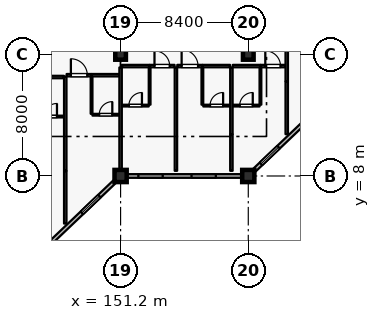
"""IFC4 building model, lengths in metres.
Left out: names, types, materials, properties, quantities, classifications, styles, units other than length and angle.
Written with IfcOpenShell. Run it as: python <this file> out.ifc"""

import sys

from ifc_helpers import new_model, si_unit, direction, frame, frame_2d, origin, origin_2d, place, context, subcontext, project, spatial, rectangle, extrude, element, fill, save


model = new_model("IFC4")
c1 = context("Model", 3, precision=1e-05, world=origin(), true_north=direction((0.0, 1.0)))
c2 = subcontext(c1, "Body", "Model", "MODEL_VIEW")
j1 = project(units=[si_unit("LENGTHUNIT", "METRE"), si_unit("PLANEANGLEUNIT", "RADIAN")], contexts=[c1])
p1 = place(None, origin())
s1 = spatial("IfcSite", under=j1, at=p1, CompositionType="ELEMENT")
p2 = place(p1, origin())
s2 = spatial("IfcBuilding", under=s1, at=p2, CompositionType="ELEMENT")
p3 = place(p2, frame((0.0, 0.0, 11.4)))
s3 = spatial("IfcBuildingStorey", under=s2, at=p3, CompositionType="ELEMENT", Elevation=11.4)
for number, where, z_axis, x_axis in (
    (1, (151.2, 8.0, 0.0), (0.0, 0.0, 1.0), (1.0, 0.0, 0.0)),
    (2, (159.6, 8.0, 0.0), (0.0, 0.0, 1.0), (1.0, 0.0, 0.0)),
):
    element("IfcColumn", number, at=place(p3, frame(where, z_axis=z_axis, x_axis=x_axis)), inside=s3, PredefinedType="COLUMN", context=c2, shape_type="SweptSolid", body=[
        extrude(rectangle(XDim=0.8, YDim=0.8, at=origin_2d()), origin(), (0.0, 0.0, 1.0), 4.8),
    ])
for number, where, z_axis, x_axis in (
    (3, (151.2, 16.0, 0.0), (0.0, 0.0, 1.0), (1.0, 0.0, 0.0)),
    (4, (159.6, 16.0, 0.0), (0.0, 0.0, 1.0), (1.0, 0.0, 0.0)),
):
    element("IfcColumn", number, at=place(p3, frame(where, z_axis=z_axis, x_axis=x_axis)), inside=s3, PredefinedType="COLUMN", context=c2, shape_type="SweptSolid", body=[
        extrude(rectangle(XDim=0.7, YDim=0.7, at=origin_2d()), origin(), (0.0, 0.0, 1.0), 4.8),
    ])
p4 = place(p3, frame((150.8, 7.619, 0.0), z_axis=(0.0, 0.0, 1.0), x_axis=(-0.724156739794, -0.689635422677, 0.0)))
e5 = element("IfcWall", 5, at=p4, inside=s3, PredefinedType="SOLIDWALL", context=c2, shape_type="SweptSolid", body=[
    extrude(rectangle(XDim=10.495, YDim=0.24, at=frame_2d((5.248, 0.0))), origin(), (0.0, 0.0, 1.0), 4.13),
])
p5 = place(p4, frame((1.368, 0.0, 0.8)))
e6 = element("IfcOpeningElement", 6, at=p5, cuts=e5, PredefinedType="OPENING", context=c2, shape_type="SweptSolid", body=[
    extrude(rectangle(XDim=1.6, YDim=1.6, at=frame_2d((0.8, 0.8))), frame((0.0, 0.13, 0.0), z_axis=(0.0, -1.0, 0.0), x_axis=(1.0, 0.0, 0.0)), (0.0, 0.0, 1.0), 0.26),
])
p6 = place(p4, frame((6.194, 0.0, 0.8)))
e7 = element("IfcOpeningElement", 7, at=p6, cuts=e5, PredefinedType="OPENING", context=c2, shape_type="SweptSolid", body=[
    extrude(rectangle(XDim=1.6, YDim=1.6, at=frame_2d((0.8, 0.8))), frame((0.0, 0.13, 0.0), z_axis=(0.0, -1.0, 0.0), x_axis=(1.0, 0.0, 0.0)), (0.0, 0.0, 1.0), 0.26),
])
p7 = place(p3, frame((159.2, 8.0, 0.0), z_axis=(0.0, 0.0, 1.0), x_axis=(-1.0, 0.0, 0.0)))
e8 = element("IfcWall", 8, at=p7, inside=s3, PredefinedType="SOLIDWALL", context=c2, shape_type="SweptSolid", body=[
    extrude(rectangle(XDim=7.6, YDim=0.24, at=frame_2d((3.8, 0.0))), origin(), (0.0, 0.0, 1.0), 4.13),
])
p8 = place(p7, frame((1.735, 0.0, 0.8)))
e9 = element("IfcOpeningElement", 9, at=p8, cuts=e8, PredefinedType="OPENING", context=c2, shape_type="SweptSolid", body=[
    extrude(rectangle(XDim=1.6, YDim=1.6, at=frame_2d((0.8, 0.8))), frame((0.0, 0.13, 0.0), z_axis=(0.0, -1.0, 0.0), x_axis=(1.0, 0.0, 0.0)), (0.0, 0.0, 1.0), 0.26),
])
p9 = place(p7, frame((5.23, 0.0, 0.8)))
e10 = element("IfcOpeningElement", 10, at=p9, cuts=e8, PredefinedType="OPENING", context=c2, shape_type="SweptSolid", body=[
    extrude(rectangle(XDim=1.6, YDim=1.6, at=frame_2d((0.8, 0.8))), frame((0.0, 0.13, 0.0), z_axis=(0.0, -1.0, 0.0), x_axis=(1.0, 0.0, 0.0)), (0.0, 0.0, 1.0), 0.26),
])
p10 = place(p3, frame((167.6, 15.619, 0.0), z_axis=(0.0, 0.0, 1.0), x_axis=(-0.724156739794, -0.689635422677, 0.0)))
e11 = element("IfcWall", 11, at=p10, inside=s3, PredefinedType="SOLIDWALL", context=c2, shape_type="SweptSolid", body=[
    extrude(rectangle(XDim=10.495, YDim=0.24, at=frame_2d((5.248, 0.0))), origin(), (0.0, 0.0, 1.0), 4.13),
])
p11 = place(p10, frame((0.388, 0.0, 0.8)))
e12 = element("IfcOpeningElement", 12, at=p11, cuts=e11, PredefinedType="OPENING", context=c2, shape_type="SweptSolid", body=[
    extrude(rectangle(XDim=1.6, YDim=1.6, at=frame_2d((0.8, 0.8))), frame((0.0, 0.13, 0.0), z_axis=(0.0, -1.0, 0.0), x_axis=(1.0, 0.0, 0.0)), (0.0, 0.0, 1.0), 0.26),
])
p12 = place(p10, frame((4.234, 0.0, 0.8)))
e13 = element("IfcOpeningElement", 13, at=p12, cuts=e11, PredefinedType="OPENING", context=c2, shape_type="SweptSolid", body=[
    extrude(rectangle(XDim=1.6, YDim=1.6, at=frame_2d((0.8, 0.8))), frame((0.0, 0.13, 0.0), z_axis=(0.0, -1.0, 0.0), x_axis=(1.0, 0.0, 0.0)), (0.0, 0.0, 1.0), 0.26),
])
p13 = place(p10, frame((8.294, 0.0, 0.8)))
e14 = element("IfcOpeningElement", 14, at=p13, cuts=e11, PredefinedType="OPENING", context=c2, shape_type="SweptSolid", body=[
    extrude(rectangle(XDim=1.6, YDim=1.6, at=frame_2d((0.8, 0.8))), frame((0.0, 0.13, 0.0), z_axis=(0.0, -1.0, 0.0), x_axis=(1.0, 0.0, 0.0)), (0.0, 0.0, 1.0), 0.26),
])
p14 = place(p3, frame((145.66, 14.51, 0.0), z_axis=(0.0, 0.0, 1.0), x_axis=(1.0, 0.0, 0.0)))
e15 = element("IfcWall", 15, at=p14, inside=s3, PredefinedType="PARTITIONING", context=c2, shape_type="SweptSolid", body=[
    extrude(rectangle(XDim=1.81, YDim=0.16, at=frame_2d((0.905, 0.0))), origin(), (0.0, 0.0, 1.0), 4.535),
])
p15 = place(p3, frame((145.71, 11.91, 0.0), z_axis=(0.0, 0.0, 1.0), x_axis=(1.0, 0.0, 0.0)))
e16 = element("IfcWall", 16, at=p15, inside=s3, PredefinedType="PARTITIONING", context=c2, shape_type="SweptSolid", body=[
    extrude(rectangle(XDim=1.75, YDim=0.115, at=frame_2d((0.875, 0.0))), origin(), (0.0, 0.0, 1.0), 4.535),
])
p16 = place(p15, frame((0.445, 0.0, 0.0)))
e17 = element("IfcOpeningElement", 17, at=p16, cuts=e16, PredefinedType="OPENING", context=c2, shape_type="SweptSolid", body=[
    extrude(rectangle(XDim=0.86, YDim=2.12, at=frame_2d((0.43, 1.06))), frame((0.0, 0.067, 0.0), z_axis=(0.0, -1.0, 0.0), x_axis=(1.0, 0.0, 0.0)), (0.0, 0.0, 1.0), 0.135),
])
p17 = place(p3, frame((147.56, 4.87, 0.0), z_axis=(0.0, 0.0, 1.0), x_axis=(0.0, 1.0, 0.0)))
e18 = element("IfcWall", 18, at=p17, inside=s3, PredefinedType="PARTITIONING", context=c2, shape_type="SweptSolid", body=[
    extrude(rectangle(XDim=3.46, YDim=0.16, at=frame_2d((1.73, 0.0))), origin(), (0.0, 0.0, 1.0), 4.535),
])
p18 = place(p3, frame((147.65, 14.63, 0.0), z_axis=(0.0, 0.0, 1.0), x_axis=(1.0, 0.0, 0.0)))
e19 = element("IfcWall", 19, at=p18, inside=s3, PredefinedType="PARTITIONING", context=c2, shape_type="SweptSolid", body=[
    extrude(rectangle(XDim=1.64, YDim=0.16, at=frame_2d((0.82, 0.0))), origin(), (0.0, 0.0, 1.0), 4.535),
])
p19 = place(p18, frame((0.28, 0.0, 0.0)))
e20 = element("IfcOpeningElement", 20, at=p19, cuts=e19, PredefinedType="OPENING", context=c2, shape_type="SweptSolid", body=[
    extrude(rectangle(XDim=1.08, YDim=2.3, at=frame_2d((0.54, 1.15))), frame((0.0, 0.09, 0.0), z_axis=(0.0, -1.0, 0.0), x_axis=(1.0, 0.0, 0.0)), (0.0, 0.0, 1.0), 0.18),
])
p20 = place(p3, frame((149.3, 14.63, 0.0), z_axis=(0.0, 0.0, 1.0), x_axis=(1.0, 0.0, 0.0)))
e21 = element("IfcWall", 21, at=p20, inside=s3, PredefinedType="PARTITIONING", context=c2, shape_type="SweptSolid", body=[
    extrude(rectangle(XDim=1.81, YDim=0.16, at=frame_2d((0.905, 0.0))), origin(), (0.0, 0.0, 1.0), 4.535),
])
p21 = place(p3, frame((149.29, 12.09, 0.0), z_axis=(0.0, 0.0, 1.0), x_axis=(0.0, 1.0, 0.0)))
e22 = element("IfcWall", 22, at=p21, inside=s3, PredefinedType="PARTITIONING", context=c2, shape_type="SweptSolid", body=[
    extrude(rectangle(XDim=2.45, YDim=0.115, at=frame_2d((1.225, 0.0))), origin(), (0.0, 0.0, 1.0), 4.535),
])
p22 = place(p3, frame((149.35, 12.03, 0.0), z_axis=(0.0, 0.0, 1.0), x_axis=(1.0, 0.0, 0.0)))
e23 = element("IfcWall", 23, at=p22, inside=s3, PredefinedType="PARTITIONING", context=c2, shape_type="SweptSolid", body=[
    extrude(rectangle(XDim=1.75, YDim=0.115, at=frame_2d((0.875, 0.0))), origin(), (0.0, 0.0, 1.0), 4.535),
])
p23 = place(p22, frame((0.445, 0.0, 0.0)))
e24 = element("IfcOpeningElement", 24, at=p23, cuts=e23, PredefinedType="OPENING", context=c2, shape_type="SweptSolid", body=[
    extrude(rectangle(XDim=0.86, YDim=2.12, at=frame_2d((0.43, 1.06))), frame((0.0, 0.067, 0.0), z_axis=(0.0, -1.0, 0.0), x_axis=(1.0, 0.0, 0.0)), (0.0, 0.0, 1.0), 0.135),
])
p24 = place(p3, frame((147.56, 8.34, 0.0), z_axis=(0.0, 0.0, 1.0), x_axis=(0.0, 1.0, 0.0)))
e25 = element("IfcWall", 25, at=p24, inside=s3, PredefinedType="PARTITIONING", context=c2, shape_type="SweptSolid", body=[
    extrude(rectangle(XDim=6.2, YDim=0.16, at=frame_2d((3.1, 0.0))), origin(), (0.0, 0.0, 1.0), 4.535),
])
p25 = place(p3, frame((151.29, 15.23, 0.0), z_axis=(0.0, 0.0, 1.0), x_axis=(1.0, 0.0, 0.0)))
e26 = element("IfcWall", 26, at=p25, inside=s3, PredefinedType="PARTITIONING", context=c2, shape_type="SweptSolid", body=[
    extrude(rectangle(XDim=1.81, YDim=0.16, at=frame_2d((0.905, 0.0))), origin(), (0.0, 0.0, 1.0), 4.535),
])
p26 = place(p3, frame((153.11, 15.23, 0.0), z_axis=(0.0, 0.0, 1.0), x_axis=(1.0, 0.0, 0.0)))
e27 = element("IfcWall", 27, at=p26, inside=s3, PredefinedType="PARTITIONING", context=c2, shape_type="SweptSolid", body=[
    extrude(rectangle(XDim=1.64, YDim=0.16, at=frame_2d((0.82, 0.0))), origin(), (0.0, 0.0, 1.0), 4.535),
])
p27 = place(p26, frame((0.32, 0.0, 0.0)))
e28 = element("IfcOpeningElement", 28, at=p27, cuts=e27, PredefinedType="OPENING", context=c2, shape_type="SweptSolid", body=[
    extrude(rectangle(XDim=1.0, YDim=2.25, at=frame_2d((0.5, 1.125))), frame((0.0, 0.09, 0.0), z_axis=(0.0, -1.0, 0.0), x_axis=(1.0, 0.0, 0.0)), (0.0, 0.0, 1.0), 0.18),
])
p28 = place(p3, frame((153.11, 12.69, 0.0), z_axis=(0.0, 0.0, 1.0), x_axis=(0.0, 1.0, 0.0)))
e29 = element("IfcWall", 29, at=p28, inside=s3, PredefinedType="PARTITIONING", context=c2, shape_type="SweptSolid", body=[
    extrude(rectangle(XDim=2.45, YDim=0.115, at=frame_2d((1.225, 0.0))), origin(), (0.0, 0.0, 1.0), 4.535),
])
p29 = place(p3, frame((151.3, 12.63, 0.0), z_axis=(0.0, 0.0, 1.0), x_axis=(1.0, 0.0, 0.0)))
e30 = element("IfcWall", 30, at=p29, inside=s3, PredefinedType="PARTITIONING", context=c2, shape_type="SweptSolid", body=[
    extrude(rectangle(XDim=1.75, YDim=0.115, at=frame_2d((0.875, 0.0))), origin(), (0.0, 0.0, 1.0), 4.535),
])
p30 = place(p29, frame((0.445, 0.0, 0.0)))
e31 = element("IfcOpeningElement", 31, at=p30, cuts=e30, PredefinedType="OPENING", context=c2, shape_type="SweptSolid", body=[
    extrude(rectangle(XDim=0.86, YDim=2.12, at=frame_2d((0.43, 1.06))), frame((0.0, 0.067, 0.0), z_axis=(0.0, -1.0, 0.0), x_axis=(1.0, 0.0, 0.0)), (0.0, 0.0, 1.0), 0.135),
])
p31 = place(p3, frame((151.2, 8.34, 0.0), z_axis=(0.0, 0.0, 1.0), x_axis=(0.0, 1.0, 0.0)))
e32 = element("IfcWall", 32, at=p31, inside=s3, PredefinedType="PARTITIONING", context=c2, shape_type="SweptSolid", body=[
    extrude(rectangle(XDim=6.8, YDim=0.16, at=frame_2d((3.4, 0.0))), origin(), (0.0, 0.0, 1.0), 3.98),
])
p32 = place(p3, frame((154.93, 15.23, 0.0), z_axis=(0.0, 0.0, 1.0), x_axis=(1.0, 0.0, 0.0)))
e33 = element("IfcWall", 33, at=p32, inside=s3, PredefinedType="PARTITIONING", context=c2, shape_type="SweptSolid", body=[
    extrude(rectangle(XDim=1.65, YDim=0.16, at=frame_2d((0.825, 0.0))), origin(), (0.0, 0.0, 1.0), 4.535),
])
p33 = place(p32, frame((0.285, 0.0, 0.0)))
e34 = element("IfcOpeningElement", 34, at=p33, cuts=e33, PredefinedType="OPENING", context=c2, shape_type="SweptSolid", body=[
    extrude(rectangle(XDim=1.08, YDim=2.3, at=frame_2d((0.54, 1.15))), frame((0.0, 0.09, 0.0), z_axis=(0.0, -1.0, 0.0), x_axis=(1.0, 0.0, 0.0)), (0.0, 0.0, 1.0), 0.18),
])
p34 = place(p3, frame((156.59, 15.23, 0.0), z_axis=(0.0, 0.0, 1.0), x_axis=(1.0, 0.0, 0.0)))
e35 = element("IfcWall", 35, at=p34, inside=s3, PredefinedType="PARTITIONING", context=c2, shape_type="SweptSolid", body=[
    extrude(rectangle(XDim=1.81, YDim=0.16, at=frame_2d((0.905, 0.0))), origin(), (0.0, 0.0, 1.0), 4.535),
])
p35 = place(p3, frame((156.58, 12.69, 0.0), z_axis=(0.0, 0.0, 1.0), x_axis=(0.0, 1.0, 0.0)))
e36 = element("IfcWall", 36, at=p35, inside=s3, PredefinedType="PARTITIONING", context=c2, shape_type="SweptSolid", body=[
    extrude(rectangle(XDim=2.45, YDim=0.115, at=frame_2d((1.225, 0.0))), origin(), (0.0, 0.0, 1.0), 4.535),
])
p36 = place(p3, frame((156.64, 12.63, 0.0), z_axis=(0.0, 0.0, 1.0), x_axis=(1.0, 0.0, 0.0)))
e37 = element("IfcWall", 37, at=p36, inside=s3, PredefinedType="PARTITIONING", context=c2, shape_type="SweptSolid", body=[
    extrude(rectangle(XDim=1.75, YDim=0.115, at=frame_2d((0.875, 0.0))), origin(), (0.0, 0.0, 1.0), 4.535),
])
p37 = place(p36, frame((0.445, 0.0, 0.0)))
e38 = element("IfcOpeningElement", 38, at=p37, cuts=e37, PredefinedType="OPENING", context=c2, shape_type="SweptSolid", body=[
    extrude(rectangle(XDim=0.86, YDim=2.12, at=frame_2d((0.43, 1.06))), frame((0.0, 0.067, 0.0), z_axis=(0.0, -1.0, 0.0), x_axis=(1.0, 0.0, 0.0)), (0.0, 0.0, 1.0), 0.135),
])
p38 = place(p3, frame((154.84, 8.34, 0.0), z_axis=(0.0, 0.0, 1.0), x_axis=(0.0, 1.0, 0.0)))
e39 = element("IfcWall", 39, at=p38, inside=s3, PredefinedType="PARTITIONING", context=c2, shape_type="SweptSolid", body=[
    extrude(rectangle(XDim=6.8, YDim=0.16, at=frame_2d((3.4, 0.0))), origin(), (0.0, 0.0, 1.0), 4.535),
])
p39 = place(p3, frame((158.49, 8.34, 0.0), z_axis=(0.0, 0.0, 1.0), x_axis=(0.0, 1.0, 0.0)))
e40 = element("IfcWall", 40, at=p39, inside=s3, PredefinedType="PARTITIONING", context=c2, shape_type="SweptSolid", body=[
    extrude(rectangle(XDim=2.4, YDim=0.16, at=frame_2d((1.2, 0.0))), origin(), (0.0, 0.0, 1.0), 4.535),
])
p40 = place(p3, frame((158.58, 15.23, 0.0), z_axis=(0.0, 0.0, 1.0), x_axis=(1.0, 0.0, 0.0)))
e41 = element("IfcWall", 41, at=p40, inside=s3, PredefinedType="PARTITIONING", context=c2, shape_type="SweptSolid", body=[
    extrude(rectangle(XDim=1.81, YDim=0.16, at=frame_2d((0.905, 0.0))), origin(), (0.0, 0.0, 1.0), 4.535),
])
p41 = place(p3, frame((160.4, 15.23, 0.0), z_axis=(0.0, 0.0, 1.0), x_axis=(1.0, 0.0, 0.0)))
e42 = element("IfcWall", 42, at=p41, inside=s3, PredefinedType="PARTITIONING", context=c2, shape_type="SweptSolid", body=[
    extrude(rectangle(XDim=1.64, YDim=0.16, at=frame_2d((0.82, 0.0))), origin(), (0.0, 0.0, 1.0), 4.535),
])
p42 = place(p41, frame((0.32, 0.0, 0.0)))
e43 = element("IfcOpeningElement", 43, at=p42, cuts=e42, PredefinedType="OPENING", context=c2, shape_type="SweptSolid", body=[
    extrude(rectangle(XDim=1.0, YDim=2.25, at=frame_2d((0.5, 1.125))), frame((0.0, 0.09, 0.0), z_axis=(0.0, -1.0, 0.0), x_axis=(1.0, 0.0, 0.0)), (0.0, 0.0, 1.0), 0.18),
])
p43 = place(p3, frame((160.4, 12.69, 0.0), z_axis=(0.0, 0.0, 1.0), x_axis=(0.0, 1.0, 0.0)))
e44 = element("IfcWall", 44, at=p43, inside=s3, PredefinedType="PARTITIONING", context=c2, shape_type="SweptSolid", body=[
    extrude(rectangle(XDim=2.45, YDim=0.115, at=frame_2d((1.225, 0.0))), origin(), (0.0, 0.0, 1.0), 4.535),
])
p44 = place(p3, frame((158.59, 12.63, 0.0), z_axis=(0.0, 0.0, 1.0), x_axis=(1.0, 0.0, 0.0)))
e45 = element("IfcWall", 45, at=p44, inside=s3, PredefinedType="PARTITIONING", context=c2, shape_type="SweptSolid", body=[
    extrude(rectangle(XDim=1.75, YDim=0.115, at=frame_2d((0.875, 0.0))), origin(), (0.0, 0.0, 1.0), 4.535),
])
p45 = place(p44, frame((0.445, 0.0, 0.0)))
e46 = element("IfcOpeningElement", 46, at=p45, cuts=e45, PredefinedType="OPENING", context=c2, shape_type="SweptSolid", body=[
    extrude(rectangle(XDim=0.86, YDim=2.12, at=frame_2d((0.43, 1.06))), frame((0.0, 0.067, 0.0), z_axis=(0.0, -1.0, 0.0), x_axis=(1.0, 0.0, 0.0)), (0.0, 0.0, 1.0), 0.135),
])
p46 = place(p3, frame((158.49, 10.75, 0.0), z_axis=(0.0, 0.0, 1.0), x_axis=(0.0, 1.0, 0.0)))
e47 = element("IfcWall", 47, at=p46, inside=s3, PredefinedType="PARTITIONING", context=c2, shape_type="SweptSolid", body=[
    extrude(rectangle(XDim=4.39, YDim=0.16, at=frame_2d((2.195, 0.0))), origin(), (0.0, 0.0, 1.0), 4.535),
])
p47 = place(p3, frame((162.13, 10.75, 0.0), z_axis=(0.0, 0.0, 1.0), x_axis=(0.0, 1.0, 0.0)))
e48 = element("IfcWall", 48, at=p47, inside=s3, PredefinedType="PARTITIONING", context=c2, shape_type="SweptSolid", body=[
    extrude(rectangle(XDim=3.47, YDim=0.16, at=frame_2d((1.735, 0.0))), origin(), (0.0, 0.0, 1.0), 4.535),
])
p48 = place(p3, frame((162.13, 14.23, 0.0), z_axis=(0.0, 0.0, 1.0), x_axis=(0.0, 1.0, 0.0)))
e49 = element("IfcWall", 49, at=p48, inside=s3, PredefinedType="PARTITIONING", context=c2, shape_type="SweptSolid", body=[
    extrude(rectangle(XDim=8.91, YDim=0.16, at=frame_2d((4.455, 0.0))), origin(), (0.0, 0.0, 1.0), 4.535),
])
p49 = place(p5, origin())
e50 = element("IfcWindow", 50, at=p49, inside=s3, PartitioningType="SINGLE_PANEL", PredefinedType="WINDOW", context=c2, shape_type="SweptSolid", body=[
    extrude(rectangle(XDim=1.6, YDim=1.6, at=frame_2d((0.8, 0.8))), frame((0.0, 0.03, 0.0), z_axis=(0.0, -1.0, 0.0), x_axis=(1.0, 0.0, 0.0)), (0.0, 0.0, 1.0), 0.06),
])
fill(e6, e50)
p50 = place(p8, origin())
e51 = element("IfcWindow", 51, at=p50, inside=s3, PartitioningType="SINGLE_PANEL", PredefinedType="WINDOW", context=c2, shape_type="SweptSolid", body=[
    extrude(rectangle(XDim=1.6, YDim=1.6, at=frame_2d((0.8, 0.8))), frame((0.0, 0.03, 0.0), z_axis=(0.0, -1.0, 0.0), x_axis=(1.0, 0.0, 0.0)), (0.0, 0.0, 1.0), 0.06),
])
fill(e9, e51)
p51 = place(p9, origin())
e52 = element("IfcWindow", 52, at=p51, inside=s3, PartitioningType="SINGLE_PANEL", PredefinedType="WINDOW", context=c2, shape_type="SweptSolid", body=[
    extrude(rectangle(XDim=1.6, YDim=1.6, at=frame_2d((0.8, 0.8))), frame((0.0, 0.03, 0.0), z_axis=(0.0, -1.0, 0.0), x_axis=(1.0, 0.0, 0.0)), (0.0, 0.0, 1.0), 0.06),
])
fill(e10, e52)
p52 = place(p13, origin())
e53 = element("IfcWindow", 53, at=p52, inside=s3, PartitioningType="SINGLE_PANEL", PredefinedType="WINDOW", context=c2, shape_type="SweptSolid", body=[
    extrude(rectangle(XDim=1.6, YDim=1.6, at=frame_2d((0.8, 0.8))), frame((0.0, 0.03, 0.0), z_axis=(0.0, -1.0, 0.0), x_axis=(1.0, 0.0, 0.0)), (0.0, 0.0, 1.0), 0.06),
])
fill(e14, e53)
p53 = place(p16, origin())
e54 = element("IfcDoor", 54, at=p53, inside=s3, OperationType="SINGLE_SWING_RIGHT", PredefinedType="DOOR", context=c2, shape_type="SweptSolid", body=[
    extrude(rectangle(XDim=0.86, YDim=2.12, at=frame_2d((0.43, 1.06))), frame((0.0, 0.025, 0.0), z_axis=(0.0, -1.0, 0.0), x_axis=(1.0, 0.0, 0.0)), (0.0, 0.0, 1.0), 0.05),
])
fill(e17, e54)
p54 = place(p19, origin())
e55 = element("IfcDoor", 55, at=p54, inside=s3, OperationType="SINGLE_SWING_LEFT", PredefinedType="DOOR", context=c2, shape_type="SweptSolid", body=[
    extrude(rectangle(XDim=1.08, YDim=2.3, at=frame_2d((0.54, 1.15))), frame((0.0, 0.025, 0.0), z_axis=(0.0, -1.0, 0.0), x_axis=(1.0, 0.0, 0.0)), (0.0, 0.0, 1.0), 0.05),
])
fill(e20, e55)
p55 = place(p23, origin())
e56 = element("IfcDoor", 56, at=p55, inside=s3, OperationType="SINGLE_SWING_RIGHT", PredefinedType="DOOR", context=c2, shape_type="SweptSolid", body=[
    extrude(rectangle(XDim=0.86, YDim=2.12, at=frame_2d((0.43, 1.06))), frame((0.0, 0.025, 0.0), z_axis=(0.0, -1.0, 0.0), x_axis=(1.0, 0.0, 0.0)), (0.0, 0.0, 1.0), 0.05),
])
fill(e24, e56)
p56 = place(p27, origin())
e57 = element("IfcDoor", 57, at=p56, inside=s3, OperationType="SINGLE_SWING_LEFT", PredefinedType="DOOR", context=c2, shape_type="SweptSolid", body=[
    extrude(rectangle(XDim=1.0, YDim=2.25, at=frame_2d((0.5, 1.125))), frame((0.0, 0.025, 0.0), z_axis=(0.0, -1.0, 0.0), x_axis=(1.0, 0.0, 0.0)), (0.0, 0.0, 1.0), 0.05),
])
fill(e28, e57)
p57 = place(p30, origin())
e58 = element("IfcDoor", 58, at=p57, inside=s3, OperationType="SINGLE_SWING_RIGHT", PredefinedType="DOOR", context=c2, shape_type="SweptSolid", body=[
    extrude(rectangle(XDim=0.86, YDim=2.12, at=frame_2d((0.43, 1.06))), frame((0.0, 0.025, 0.0), z_axis=(0.0, -1.0, 0.0), x_axis=(1.0, 0.0, 0.0)), (0.0, 0.0, 1.0), 0.05),
])
fill(e31, e58)
p58 = place(p33, origin())
e59 = element("IfcDoor", 59, at=p58, inside=s3, OperationType="SINGLE_SWING_LEFT", PredefinedType="DOOR", context=c2, shape_type="SweptSolid", body=[
    extrude(rectangle(XDim=1.08, YDim=2.3, at=frame_2d((0.54, 1.15))), frame((0.0, 0.025, 0.0), z_axis=(0.0, -1.0, 0.0), x_axis=(1.0, 0.0, 0.0)), (0.0, 0.0, 1.0), 0.05),
])
fill(e34, e59)
p59 = place(p37, origin())
e60 = element("IfcDoor", 60, at=p59, inside=s3, OperationType="SINGLE_SWING_RIGHT", PredefinedType="DOOR", context=c2, shape_type="SweptSolid", body=[
    extrude(rectangle(XDim=0.86, YDim=2.12, at=frame_2d((0.43, 1.06))), frame((0.0, 0.025, 0.0), z_axis=(0.0, -1.0, 0.0), x_axis=(1.0, 0.0, 0.0)), (0.0, 0.0, 1.0), 0.05),
])
fill(e38, e60)
p60 = place(p42, origin())
e61 = element("IfcDoor", 61, at=p60, inside=s3, OperationType="SINGLE_SWING_LEFT", PredefinedType="DOOR", context=c2, shape_type="SweptSolid", body=[
    extrude(rectangle(XDim=1.0, YDim=2.25, at=frame_2d((0.5, 1.125))), frame((0.0, 0.025, 0.0), z_axis=(0.0, -1.0, 0.0), x_axis=(1.0, 0.0, 0.0)), (0.0, 0.0, 1.0), 0.05),
])
fill(e43, e61)
p61 = place(p45, origin())
e62 = element("IfcDoor", 62, at=p61, inside=s3, OperationType="SINGLE_SWING_RIGHT", PredefinedType="DOOR", context=c2, shape_type="SweptSolid", body=[
    extrude(rectangle(XDim=0.86, YDim=2.12, at=frame_2d((0.43, 1.06))), frame((0.0, 0.025, 0.0), z_axis=(0.0, -1.0, 0.0), x_axis=(1.0, 0.0, 0.0)), (0.0, 0.0, 1.0), 0.05),
])
fill(e46, e62)
save(model, sys.argv[1])
